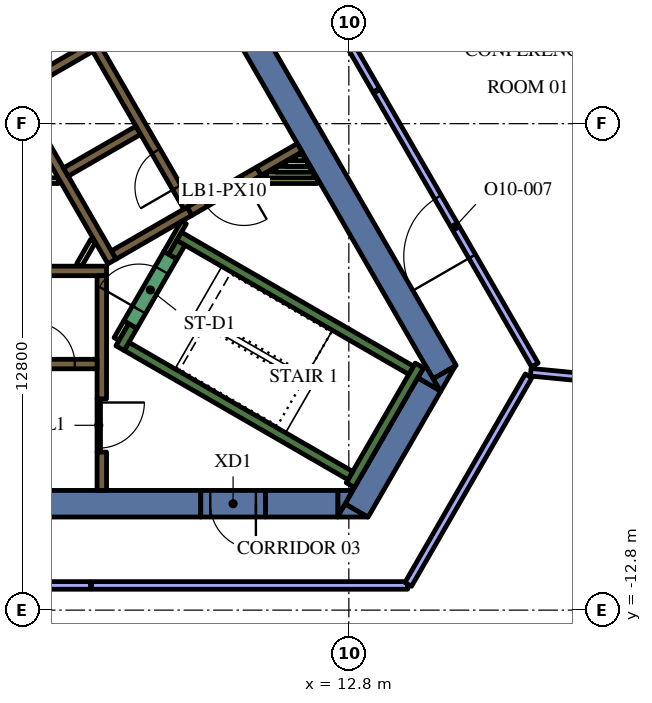
"""IFC4 building model, lengths in metres.
Left out: names, types, materials, properties, quantities, classifications, styles, units other than length and angle.
Written with IfcOpenShell. Run it as: python <this file> out.ifc"""

import sys

from ifc_helpers import new_model, si_unit, direction, frame, frame_2d, origin, place, context, subcontext, project, spatial, polyline, rectangle, outline, extrude, element, fill, save


model = new_model("IFC4")
c1 = context("Model", 3, precision=1e-05, world=origin(), true_north=direction((0.0, 1.0)))
c2 = subcontext(c1, "Body", "Model", "MODEL_VIEW")
j1 = project(units=[si_unit("LENGTHUNIT", "METRE"), si_unit("PLANEANGLEUNIT", "RADIAN")], contexts=[c1])
p1 = place(None, origin())
s1 = spatial("IfcSite", under=j1, at=p1, CompositionType="ELEMENT")
p2 = place(p1, origin())
s2 = spatial("IfcBuilding", under=s1, at=p2, CompositionType="ELEMENT")
p3 = place(p2, frame((0.0, 0.0, 252.0)))
s3 = spatial("IfcBuildingStorey", under=s2, at=p3, CompositionType="ELEMENT", Elevation=252.0)
p4 = place(p3, frame((9.085, 4.264, 0.0), z_axis=(0.0, 0.0, 1.0), x_axis=(0.499998082512, -0.866026510844, 0.0)))
e1 = element("IfcWall", 1, at=p4, inside=s3, PredefinedType="SOLIDWALL", context=c2, shape_type="SweptSolid", body=[
    extrude(rectangle(XDim=12.472, YDim=0.7, at=frame_2d((6.236, 0.0))), origin(), (0.0, 0.0, 1.0), 4.2),
])
p5 = place(p3, origin())
e2 = element("IfcWall", 2, at=p5, inside=s3, PredefinedType="SOLIDWALL", context=c2, shape_type="SweptSolid", body=[
    extrude(outline(polyline([(15.213, -7.05), (15.019, -6.714), (15.601, -6.378), (15.213, -7.05)])), origin(), (0.0, 0.0, 1.0), 4.2),
])
p6 = place(p3, frame((13.003, -10.179, 0.0), z_axis=(0.0, 0.0, 1.0), x_axis=(0.499972675833, 0.866041178825, 0.0)))
e3 = element("IfcWall", 3, at=p6, inside=s3, PredefinedType="SOLIDWALL", context=c2, shape_type="SweptSolid", body=[
    extrude(rectangle(XDim=3.829, YDim=0.7, at=frame_2d((1.915, 0.0))), origin(), (0.0, 0.0, 1.0), 4.2),
])
e4 = element("IfcWall", 4, at=p5, inside=s3, PredefinedType="SOLIDWALL", context=c2, shape_type="SweptSolid", body=[
    extrude(outline(polyline([(12.5, -10.35), (12.698, -10.005), (13.296, -10.35), (12.5, -10.35)])), origin(), (0.0, 0.0, 1.0), 4.2),
])
e5 = element("IfcWall", 5, at=p5, inside=s3, PredefinedType="SOLIDWALL", context=c2, shape_type="SweptSolid", body=[
    extrude(outline(polyline([(14.809, -6.35), (15.197, -7.022), (14.615, -6.686), (14.809, -6.35)])), origin(), (0.0, 0.0, 1.0), 4.2),
])
p7 = place(p3, frame((10.604, -10.0, 0.0), z_axis=(0.0, 0.0, 1.0), x_axis=(1.0, 0.0, 0.0)))
e6 = element("IfcWall", 6, at=p7, inside=s3, PredefinedType="SOLIDWALL", context=c2, shape_type="SweptSolid", body=[
    extrude(rectangle(XDim=1.909, YDim=0.7, at=frame_2d((0.955, 0.0))), origin(), (0.0, 0.0, 1.0), 4.2),
])
e7 = element("IfcWall", 7, at=p5, inside=s3, PredefinedType="SOLIDWALL", context=c2, shape_type="SweptSolid", body=[
    extrude(outline(polyline([(12.904, -9.65), (12.516, -10.322), (12.516, -9.65), (12.904, -9.65)])), origin(), (0.0, 0.0, 1.0), 4.2),
])
p8 = place(p3, frame((8.904, -10.0, 0.0), z_axis=(0.0, 0.0, 1.0), x_axis=(-1.0, 0.0, 0.0)))
e8 = element("IfcWall", 8, at=p8, inside=s3, PredefinedType="SOLIDWALL", context=c2, shape_type="SweptSolid", body=[
    extrude(rectangle(XDim=22.226, YDim=0.7, at=frame_2d((11.113, 0.0))), origin(), (0.0, 0.0, 1.0), 4.2),
])
p9 = place(p3, frame((12.84, -9.511, 0.0), z_axis=(0.0, 0.0, 1.0), x_axis=(0.500048121057, 0.865997619297, 0.0)))
e9 = element("IfcWall", 9, at=p9, inside=s3, PredefinedType="SOLIDWALL", context=c2, shape_type="SweptSolid", body=[
    extrude(rectangle(XDim=3.634, YDim=0.25, at=frame_2d((1.817, 0.0))), origin(), (0.0, 0.0, 1.0), 4.2),
])
p10 = place(p3, frame((12.84, -9.261, 0.0), z_axis=(0.0, 0.0, 1.0), x_axis=(-0.866013990052, 0.500019768644, 0.0)))
e10 = element("IfcWall", 10, at=p10, inside=s3, PredefinedType="SOLIDWALL", context=c2, shape_type="SweptSolid", body=[
    extrude(rectangle(XDim=6.8, YDim=0.25, at=frame_2d((3.4, 0.0))), origin(), (0.0, 0.0, 1.0), 4.2),
])
p11 = place(p3, frame((6.78, -5.906, 0.0), z_axis=(0.0, 0.0, 1.0), x_axis=(0.500223362819, 0.865896406789, 0.0)))
e11 = element("IfcWall", 11, at=p11, inside=s3, PredefinedType="SOLIDWALL", context=c2, shape_type="SweptSolid", body=[
    extrude(rectangle(XDim=0.675, YDim=0.25, at=frame_2d((0.337, 0.0))), origin(), (0.0, 0.0, 1.0), 4.2),
])
p12 = place(p3, frame((8.334, -2.964, 0.0), z_axis=(0.0, 0.0, 1.0), x_axis=(0.866016039709, -0.500016218704, 0.0)))
e12 = element("IfcWall", 12, at=p12, inside=s3, PredefinedType="SOLIDWALL", context=c2, shape_type="SweptSolid", body=[
    extrude(rectangle(XDim=7.05, YDim=0.25, at=frame_2d((3.525, 0.0))), origin(), (0.0, 0.0, 1.0), 4.2),
])
p13 = place(p3, frame((8.168, -3.503, 0.0), z_axis=(0.0, 0.0, 1.0), x_axis=(0.49972245349, 0.866185586049, 0.0)))
e13 = element("IfcWall", 13, at=p13, inside=s3, PredefinedType="SOLIDWALL", context=c2, shape_type="SweptSolid", body=[
    extrude(rectangle(XDim=0.425, YDim=0.25, at=frame_2d((0.212, 0.0))), origin(), (0.0, 0.0, 1.0), 4.2),
])
p14 = place(p3, frame((-5.545, -3.875, 0.0), z_axis=(0.0, 0.0, 1.0), x_axis=(1.0, 0.0, 0.0)))
e14 = element("IfcWall", 14, at=p14, inside=s3, PredefinedType="SOLIDWALL", context=c2, shape_type="SweptSolid", body=[
    extrude(rectangle(XDim=11.97, YDim=0.25, at=frame_2d((5.985, 0.0))), origin(), (0.0, 0.0, 1.0), 4.2),
])
p15 = place(p3, frame((6.3, -7.24, 0.0), z_axis=(0.0, 0.0, 1.0), x_axis=(0.0, 1.0, 0.0)))
e15 = element("IfcWall", 15, at=p15, inside=s3, PredefinedType="SOLIDWALL", context=c2, shape_type="SweptSolid", body=[
    extrude(rectangle(XDim=3.24, YDim=0.25, at=frame_2d((1.62, 0.0))), origin(), (0.0, 0.0, 1.0), 4.2),
])
p16 = place(p3, frame((6.3, -9.65, 0.0), z_axis=(0.0, 0.0, 1.0), x_axis=(0.0, 1.0, 0.0)))
e16 = element("IfcWall", 16, at=p16, inside=s3, PredefinedType="SOLIDWALL", context=c2, shape_type="SweptSolid", body=[
    extrude(rectangle(XDim=1.008, YDim=0.25, at=frame_2d((0.504, 0.0))), origin(), (0.0, 0.0, 1.0), 4.2),
])
p17 = place(p3, frame((11.507, -0.631, 0.0), z_axis=(0.0, 0.0, 1.0), x_axis=(-0.866025525965, -0.499999788377, 0.0)))
e17 = element("IfcWall", 17, at=p17, inside=s3, PredefinedType="SOLIDWALL", context=c2, shape_type="SweptSolid", body=[
    extrude(rectangle(XDim=1.245, YDim=0.25, at=frame_2d((0.622, 0.0))), origin(), (0.0, 0.0, 1.0), 4.2),
])
p18 = place(p3, frame((6.568, -3.627, 0.0), z_axis=(0.0, 0.0, 1.0), x_axis=(-0.499999455981, 0.866025717874, 0.0)))
e18 = element("IfcWall", 18, at=p18, inside=s3, PredefinedType="SOLIDWALL", context=c2, shape_type="SweptSolid", body=[
    extrude(rectangle(XDim=11.978, YDim=0.25, at=frame_2d((5.989, 0.0))), origin(), (0.0, 0.0, 1.0), 4.2),
])
for number, where, z_axis, x_axis in (
    (19, (4.094, 0.909, 0.0), (0.0, 0.0, 1.0), (0.866, 0.5, 0.0)),
    (20, (5.354, -1.274, 0.0), (0.0, 0.0, 1.0), (0.866, 0.5, 0.0)),
):
    element("IfcWall", number, at=place(p3, frame(where, z_axis=z_axis, x_axis=x_axis)), inside=s3, PredefinedType="SOLIDWALL", context=c2, shape_type="SweptSolid", body=[
        extrude(rectangle(XDim=2.2, YDim=0.25, at=frame_2d((1.1, 0.0))), origin(), (0.0, 0.0, 1.0), 4.2),
    ])
p19 = place(p3, frame((6.614, -3.456, 0.0), z_axis=(0.0, 0.0, 1.0), x_axis=(0.866025089694, 0.500000544019, 0.0)))
e21 = element("IfcWall", 21, at=p19, inside=s3, PredefinedType="SOLIDWALL", context=c2, shape_type="SweptSolid", body=[
    extrude(rectangle(XDim=2.305, YDim=0.25, at=frame_2d((1.153, 0.0))), origin(), (0.0, 0.0, 1.0), 4.2),
])
p20 = place(p3, frame((10.362, -1.5, 0.0), z_axis=(0.0, 0.0, 1.0), x_axis=(1.0, 0.0, 0.0)))
e22 = element("IfcWall", 22, at=p20, inside=s3, PredefinedType="PARTITIONING", context=c2, shape_type="SweptSolid", body=[
    extrude(rectangle(XDim=1.61, YDim=0.15, at=frame_2d((0.805, 0.0))), origin(), (0.0, 0.0, 1.0), 3.4),
])
p21 = place(p3, frame((10.622, -1.35, 0.0), z_axis=(0.0, 0.0, 1.0), x_axis=(1.0, 0.0, 0.0)))
e23 = element("IfcWall", 23, at=p21, inside=s3, PredefinedType="PARTITIONING", context=c2, shape_type="SweptSolid", body=[
    extrude(rectangle(XDim=1.263, YDim=0.15, at=frame_2d((0.632, 0.0))), origin(), (0.0, 0.0, 1.0), 3.4),
])
p22 = place(p3, frame((10.882, -1.2, 0.0), z_axis=(0.0, 0.0, 1.0), x_axis=(1.0, 0.0, 0.0)))
e24 = element("IfcWall", 24, at=p22, inside=s3, PredefinedType="PARTITIONING", context=c2, shape_type="SweptSolid", body=[
    extrude(rectangle(XDim=0.917, YDim=0.15, at=frame_2d((0.459, 0.0))), origin(), (0.0, 0.0, 1.0), 3.4),
])
p23 = place(p3, frame((11.712, -1.05, 0.0), z_axis=(0.0, 0.0, 1.0), x_axis=(-1.0, 0.0, 0.0)))
e25 = element("IfcWall", 25, at=p23, inside=s3, PredefinedType="PARTITIONING", context=c2, shape_type="SweptSolid", body=[
    extrude(rectangle(XDim=0.571, YDim=0.15, at=frame_2d((0.285, 0.0))), origin(), (0.0, 0.0, 1.0), 3.4),
])
p24 = place(p3, frame((11.401, -0.9, 0.0), z_axis=(0.0, 0.0, 1.0), x_axis=(1.0, 0.0, 0.0)))
e26 = element("IfcWall", 26, at=p24, inside=s3, PredefinedType="PARTITIONING", context=c2, shape_type="SweptSolid", body=[
    extrude(rectangle(XDim=0.224, YDim=0.15, at=frame_2d((0.112, 0.0))), origin(), (0.0, 0.0, 1.0), 3.4),
])
p25 = place(p3, frame((6.945, -5.222, 0.0), z_axis=(0.0, 0.0, 1.0), x_axis=(-0.499818422106, -0.866130212453, 0.0)))
e27 = element("IfcWall", 27, at=p25, inside=s3, PredefinedType="PARTITIONING", context=c2, shape_type="SweptSolid", body=[
    extrude(rectangle(XDim=0.514, YDim=0.15, at=frame_2d((0.257, 0.0))), origin(), (0.0, 0.0, 1.0), 3.4),
])
p26 = place(p3, frame((8.459, -2.599, 0.0), z_axis=(0.0, 0.0, 1.0), x_axis=(-0.500041054325, -0.866001699761, 0.0)))
e28 = element("IfcWall", 28, at=p26, inside=s3, PredefinedType="PARTITIONING", context=c2, shape_type="SweptSolid", body=[
    extrude(rectangle(XDim=0.929, YDim=0.15, at=frame_2d((0.464, 0.0))), origin(), (0.0, 0.0, 1.0), 4.2),
])
p27 = place(p3, frame((5.705, -3.718, 0.0), z_axis=(0.0, 0.0, 1.0), x_axis=(0.499962090823, 0.866047289552, 0.0)))
e29 = element("IfcWall", 29, at=p27, inside=s3, PredefinedType="PARTITIONING", context=c2, shape_type="SweptSolid", body=[
    extrude(rectangle(XDim=0.735, YDim=0.15, at=frame_2d((0.367, 0.0))), origin(), (0.0, 0.0, 1.0), 3.4),
])
p28 = place(p3, frame((-4.2, -1.5, 0.0), z_axis=(0.0, 0.0, 1.0), x_axis=(1.0, 0.0, 0.0)))
e30 = element("IfcWall", 30, at=p28, inside=s3, PredefinedType="PARTITIONING", context=c2, shape_type="SweptSolid", body=[
    extrude(rectangle(XDim=9.359, YDim=0.15, at=frame_2d((4.68, 0.0))), origin(), (0.0, 0.0, 1.0), 3.4),
])
p29 = place(p3, frame((-6.175, -6.325, 0.0), z_axis=(0.0, 0.0, 1.0), x_axis=(1.0, 0.0, 0.0)))
e31 = element("IfcWall", 31, at=p29, inside=s3, PredefinedType="SOLIDWALL", context=c2, shape_type="SweptSolid", body=[
    extrude(rectangle(XDim=12.35, YDim=0.25, at=frame_2d((6.175, 0.0))), origin(), (0.0, 0.0, 1.0), 4.2),
])
p30 = place(p29, frame((0.585, 0.0, 0.0)))
e32 = element("IfcOpeningElement", 32, at=p30, cuts=e31, PredefinedType="OPENING", context=c2, shape_type="SweptSolid", body=[
    extrude(rectangle(XDim=1.1, YDim=2.1, at=frame_2d((0.55, 1.05))), frame((0.0, 0.135, 0.0), z_axis=(0.0, -1.0, 0.0), x_axis=(1.0, 0.0, 0.0)), (0.0, 0.0, 1.0), 0.27),
])
p31 = place(p29, frame((3.105, 0.0, 0.0)))
e33 = element("IfcOpeningElement", 33, at=p31, cuts=e31, PredefinedType="OPENING", context=c2, shape_type="SweptSolid", body=[
    extrude(rectangle(XDim=1.1, YDim=2.1, at=frame_2d((0.55, 1.05))), frame((0.0, 0.135, 0.0), z_axis=(0.0, -1.0, 0.0), x_axis=(1.0, 0.0, 0.0)), (0.0, 0.0, 1.0), 0.27),
])
p32 = place(p29, frame((5.625, 0.0, 0.0)))
e34 = element("IfcOpeningElement", 34, at=p32, cuts=e31, PredefinedType="OPENING", context=c2, shape_type="SweptSolid", body=[
    extrude(rectangle(XDim=1.1, YDim=2.1, at=frame_2d((0.55, 1.05))), frame((0.0, 0.135, 0.0), z_axis=(0.0, -1.0, 0.0), x_axis=(1.0, 0.0, 0.0)), (0.0, 0.0, 1.0), 0.27),
])
p33 = place(p29, frame((8.145, 0.0, 0.0)))
e35 = element("IfcOpeningElement", 35, at=p33, cuts=e31, PredefinedType="OPENING", context=c2, shape_type="SweptSolid", body=[
    extrude(rectangle(XDim=1.1, YDim=2.1, at=frame_2d((0.55, 1.05))), frame((0.0, 0.135, 0.0), z_axis=(0.0, -1.0, 0.0), x_axis=(1.0, 0.0, 0.0)), (0.0, 0.0, 1.0), 0.27),
])
p34 = place(p29, frame((10.665, 0.0, 0.0)))
e36 = element("IfcOpeningElement", 36, at=p34, cuts=e31, PredefinedType="OPENING", context=c2, shape_type="SweptSolid", body=[
    extrude(rectangle(XDim=1.1, YDim=2.1, at=frame_2d((0.55, 1.05))), frame((0.0, 0.135, 0.0), z_axis=(0.0, -1.0, 0.0), x_axis=(1.0, 0.0, 0.0)), (0.0, 0.0, 1.0), 0.27),
])
p35 = place(p3, frame((8.565, -2.185, 0.0), z_axis=(0.0, 0.0, 1.0), x_axis=(-0.499997954832, 0.866026584559, 0.0)))
e37 = element("IfcWall", 37, at=p35, inside=s3, PredefinedType="SOLIDWALL", context=c2, shape_type="SweptSolid", body=[
    extrude(rectangle(XDim=12.35, YDim=0.25, at=frame_2d((6.175, 0.0))), origin(), (0.0, 0.0, 1.0), 4.2),
])
p36 = place(p35, frame((0.585, 0.0, 0.0)))
e38 = element("IfcOpeningElement", 38, at=p36, cuts=e37, PredefinedType="OPENING", context=c2, shape_type="SweptSolid", body=[
    extrude(rectangle(XDim=1.1, YDim=2.1, at=frame_2d((0.55, 1.05))), frame((0.0, 0.135, 0.0), z_axis=(0.0, -1.0, 0.0), x_axis=(1.0, 0.0, 0.0)), (0.0, 0.0, 1.0), 0.27),
])
p37 = place(p3, frame((7.053, -5.284, 0.0), z_axis=(0.0, 0.0, 1.0), x_axis=(0.500078061341, 0.865980330357, 0.0)))
e39 = element("IfcWall", 39, at=p37, inside=s3, PredefinedType="SOLIDWALL", context=c2, shape_type="SweptSolid", body=[
    extrude(rectangle(XDim=2.1, YDim=0.4, at=frame_2d((1.05, 0.0))), origin(), (0.0, 0.0, 1.0), 4.2),
])
p38 = place(p37, frame((0.45, 0.0, 0.0)))
e40 = element("IfcOpeningElement", 40, at=p38, cuts=e39, PredefinedType="OPENING", context=c2, shape_type="SweptSolid", body=[
    extrude(rectangle(XDim=1.2, YDim=2.1, at=frame_2d((0.6, 1.05))), frame((0.0, 0.21, 0.0), z_axis=(0.0, -1.0, 0.0), x_axis=(1.0, 0.0, 0.0)), (0.0, 0.0, 1.0), 0.42),
])
p39 = place(p3, frame((6.22, -7.237, 0.0), z_axis=(0.0, 0.0, 1.0), x_axis=(0.0, -1.0, 0.0)))
e41 = element("IfcWall", 41, at=p39, inside=s3, PredefinedType="PARTITIONING", context=c2, shape_type="SweptSolid", body=[
    extrude(rectangle(XDim=1.4, YDim=0.09, at=frame_2d((0.7, 0.0))), origin(), (0.0, 0.0, 1.0), 3.4),
])
p40 = place(p39, frame((0.1, 0.0, 0.0)))
e42 = element("IfcOpeningElement", 42, at=p40, cuts=e41, PredefinedType="OPENING", context=c2, shape_type="SweptSolid", body=[
    extrude(rectangle(XDim=1.2, YDim=2.1, at=frame_2d((0.6, 1.05))), frame((0.0, 0.055, 0.0), z_axis=(0.0, -1.0, 0.0), x_axis=(1.0, 0.0, 0.0)), (0.0, 0.0, 1.0), 0.11),
])
p41 = place(p3, frame((10.429, -1.253, 0.0), z_axis=(0.0, 0.0, 1.0), x_axis=(-0.866009402589, -0.500027713859, 0.0)))
e43 = element("IfcWall", 43, at=p41, inside=s3, PredefinedType="SOLIDWALL", context=c2, shape_type="SweptSolid", body=[
    extrude(rectangle(XDim=2.1, YDim=0.25, at=frame_2d((1.05, 0.0))), origin(), (0.0, 0.0, 1.0), 4.2),
])
p42 = place(p41, frame((0.45, 0.0, 0.0)))
e44 = element("IfcOpeningElement", 44, at=p42, cuts=e43, PredefinedType="OPENING", context=c2, shape_type="SweptSolid", body=[
    extrude(rectangle(XDim=1.2, YDim=2.1, at=frame_2d((0.6, 1.05))), frame((0.0, 0.135, 0.0), z_axis=(0.0, -1.0, 0.0), x_axis=(1.0, 0.0, 0.0)), (0.0, 0.0, 1.0), 0.27),
])
p43 = place(p3, frame((10.604, -10.0, 0.0), z_axis=(0.0, 0.0, 1.0), x_axis=(-1.0, 0.0, 0.0)))
e45 = element("IfcWall", 45, at=p43, inside=s3, PredefinedType="SOLIDWALL", context=c2, shape_type="SweptSolid", body=[
    extrude(rectangle(XDim=1.7, YDim=0.7, at=frame_2d((0.85, 0.0))), origin(), (0.0, 0.0, 1.0), 4.2),
])
p44 = place(p43, frame((0.25, 0.0, 0.0)))
e46 = element("IfcOpeningElement", 46, at=p44, cuts=e45, PredefinedType="OPENING", context=c2, shape_type="SweptSolid", body=[
    extrude(rectangle(XDim=1.2, YDim=2.1, at=frame_2d((0.6, 1.05))), frame((0.0, 0.36, 0.0), z_axis=(0.0, -1.0, 0.0), x_axis=(1.0, 0.0, 0.0)), (0.0, 0.0, 1.0), 0.72),
])
p45 = place(p3, frame((17.586, -6.54, 0.0), z_axis=(0.0, 0.0, 1.0), x_axis=(0.995358181524, -0.096239755158, 0.0)))
e47 = element("IfcWall", 47, at=p45, inside=s3, PredefinedType="PARTITIONING", context=c2, shape_type="SweptSolid", body=[
    extrude(rectangle(XDim=3.696, YDim=0.2, at=frame_2d((1.848, 0.0))), origin(), (0.0, 0.0, 1.0), 3.4),
])
p46 = place(p3, frame((-6.0, -12.15, 0.0), z_axis=(0.0, 0.0, 1.0), x_axis=(1.0, 0.0, 0.0)))
e48 = element("IfcWall", 48, at=p46, inside=s3, PredefinedType="PARTITIONING", context=c2, shape_type="SweptSolid", body=[
    extrude(rectangle(XDim=12.0, YDim=0.2, at=frame_2d((6.0, 0.0))), origin(), (0.0, 0.0, 1.0), 3.4),
])
p47 = place(p46, frame((5.5, 0.0, 0.0)))
e49 = element("IfcOpeningElement", 49, at=p47, cuts=e48, PredefinedType="OPENING", context=c2, shape_type="SweptSolid", body=[
    extrude(rectangle(XDim=1.0, YDim=2.1, at=frame_2d((0.5, 1.05))), frame((0.0, 0.11, 0.0), z_axis=(0.0, -1.0, 0.0), x_axis=(1.0, 0.0, 0.0)), (0.0, 0.0, 1.0), 0.22),
])
p48 = place(p3, frame((6.03, -12.15, 0.0), z_axis=(0.0, 0.0, 1.0), x_axis=(1.0, 0.0, 0.0)))
e50 = element("IfcWall", 50, at=p48, inside=s3, PredefinedType="PARTITIONING", context=c2, shape_type="SweptSolid", body=[
    extrude(rectangle(XDim=8.317, YDim=0.2, at=frame_2d((4.159, 0.0))), origin(), (0.0, 0.0, 1.0), 3.4),
])
p49 = place(p3, frame((14.362, -12.124, 0.0), z_axis=(0.0, 0.0, 1.0), x_axis=(0.500017005442, 0.866015585465, 0.0)))
e51 = element("IfcWall", 51, at=p49, inside=s3, PredefinedType="PARTITIONING", context=c2, shape_type="SweptSolid", body=[
    extrude(rectangle(XDim=6.338, YDim=0.2, at=frame_2d((3.169, 0.0))), origin(), (0.0, 0.0, 1.0), 3.4),
])
p50 = place(p3, frame((13.522, 0.879, 0.0), z_axis=(0.0, 0.0, 1.0), x_axis=(-0.499994727438, 0.866028447878, 0.0)))
e52 = element("IfcWall", 52, at=p50, inside=s3, PredefinedType="PARTITIONING", context=c2, shape_type="SweptSolid", body=[
    extrude(rectangle(XDim=5.925, YDim=0.2, at=frame_2d((2.962, 0.0))), origin(), (0.0, 0.0, 1.0), 3.4),
])
p51 = place(p3, frame((17.696, -6.35, 0.0), z_axis=(0.0, 0.0, 1.0), x_axis=(-0.500009576767, 0.866019874565, 0.0)))
e53 = element("IfcWall", 53, at=p51, inside=s3, PredefinedType="PARTITIONING", context=c2, shape_type="SweptSolid", body=[
    extrude(rectangle(XDim=8.317, YDim=0.2, at=frame_2d((4.159, 0.0))), origin(), (0.0, 0.0, 1.0), 3.4),
])
p52 = place(p51, frame((3.3, 0.0, 0.0)))
e54 = element("IfcOpeningElement", 54, at=p52, cuts=e53, PredefinedType="OPENING", context=c2, shape_type="SweptSolid", body=[
    extrude(rectangle(XDim=1.8, YDim=2.1, at=frame_2d((0.9, 1.05))), frame((0.0, 0.11, 0.0), z_axis=(0.0, -1.0, 0.0), x_axis=(1.0, 0.0, 0.0)), (0.0, 0.0, 1.0), 0.22),
])
p53 = place(p34, origin())
e55 = element("IfcDoor", 55, at=p53, inside=s3, OperationType="DOUBLE_DOOR_SLIDING", PredefinedType="DOOR", context=c2, shape_type="SweptSolid", body=[
    extrude(rectangle(XDim=1.1, YDim=2.1, at=frame_2d((0.55, 1.05))), frame((0.0, 0.025, 0.0), z_axis=(0.0, -1.0, 0.0), x_axis=(1.0, 0.0, 0.0)), (0.0, 0.0, 1.0), 0.05),
])
fill(e36, e55)
p54 = place(p36, origin())
e56 = element("IfcDoor", 56, at=p54, inside=s3, OperationType="DOUBLE_DOOR_SLIDING", PredefinedType="DOOR", context=c2, shape_type="SweptSolid", body=[
    extrude(rectangle(XDim=1.1, YDim=2.1, at=frame_2d((0.55, 1.05))), frame((0.0, 0.025, 0.0), z_axis=(0.0, -1.0, 0.0), x_axis=(1.0, 0.0, 0.0)), (0.0, 0.0, 1.0), 0.05),
])
fill(e38, e56)
p55 = place(p38, origin())
e57 = element("IfcDoor", 57, at=p55, inside=s3, OperationType="SINGLE_SWING_LEFT", PredefinedType="DOOR", context=c2, shape_type="SweptSolid", body=[
    extrude(rectangle(XDim=1.2, YDim=2.1, at=frame_2d((0.6, 1.05))), frame((0.0, 0.025, 0.0), z_axis=(0.0, -1.0, 0.0), x_axis=(1.0, 0.0, 0.0)), (0.0, 0.0, 1.0), 0.05),
])
fill(e40, e57)
p56 = place(p40, origin())
e58 = element("IfcDoor", 58, at=p56, inside=s3, OperationType="SINGLE_SWING_LEFT", PredefinedType="DOOR", context=c2, shape_type="SweptSolid", body=[
    extrude(rectangle(XDim=1.2, YDim=2.1, at=frame_2d((0.6, 1.05))), frame((0.0, 0.025, 0.0), z_axis=(0.0, -1.0, 0.0), x_axis=(1.0, 0.0, 0.0)), (0.0, 0.0, 1.0), 0.05),
])
fill(e42, e58)
p57 = place(p42, origin())
e59 = element("IfcDoor", 59, at=p57, inside=s3, OperationType="SINGLE_SWING_LEFT", PredefinedType="DOOR", context=c2, shape_type="SweptSolid", body=[
    extrude(rectangle(XDim=1.2, YDim=2.1, at=frame_2d((0.6, 1.05))), frame((0.0, 0.025, 0.0), z_axis=(0.0, -1.0, 0.0), x_axis=(1.0, 0.0, 0.0)), (0.0, 0.0, 1.0), 0.05),
])
fill(e44, e59)
p58 = place(p44, origin())
e60 = element("IfcDoor", 60, at=p58, inside=s3, OperationType="SINGLE_SWING_LEFT", PredefinedType="DOOR", context=c2, shape_type="SweptSolid", body=[
    extrude(rectangle(XDim=1.2, YDim=2.1, at=frame_2d((0.6, 1.05))), frame((0.0, 0.025, 0.0), z_axis=(0.0, -1.0, 0.0), x_axis=(1.0, 0.0, 0.0)), (0.0, 0.0, 1.0), 0.05),
])
fill(e46, e60)
p59 = place(p52, origin())
e61 = element("IfcDoor", 61, at=p59, inside=s3, OperationType="DOUBLE_DOOR_SINGLE_SWING", PredefinedType="DOOR", context=c2, shape_type="SweptSolid", body=[
    extrude(rectangle(XDim=1.8, YDim=2.1, at=frame_2d((0.9, 1.05))), frame((0.0, 0.025, 0.0), z_axis=(0.0, -1.0, 0.0), x_axis=(1.0, 0.0, 0.0)), (0.0, 0.0, 1.0), 0.05),
])
fill(e54, e61)
save(model, sys.argv[1])
